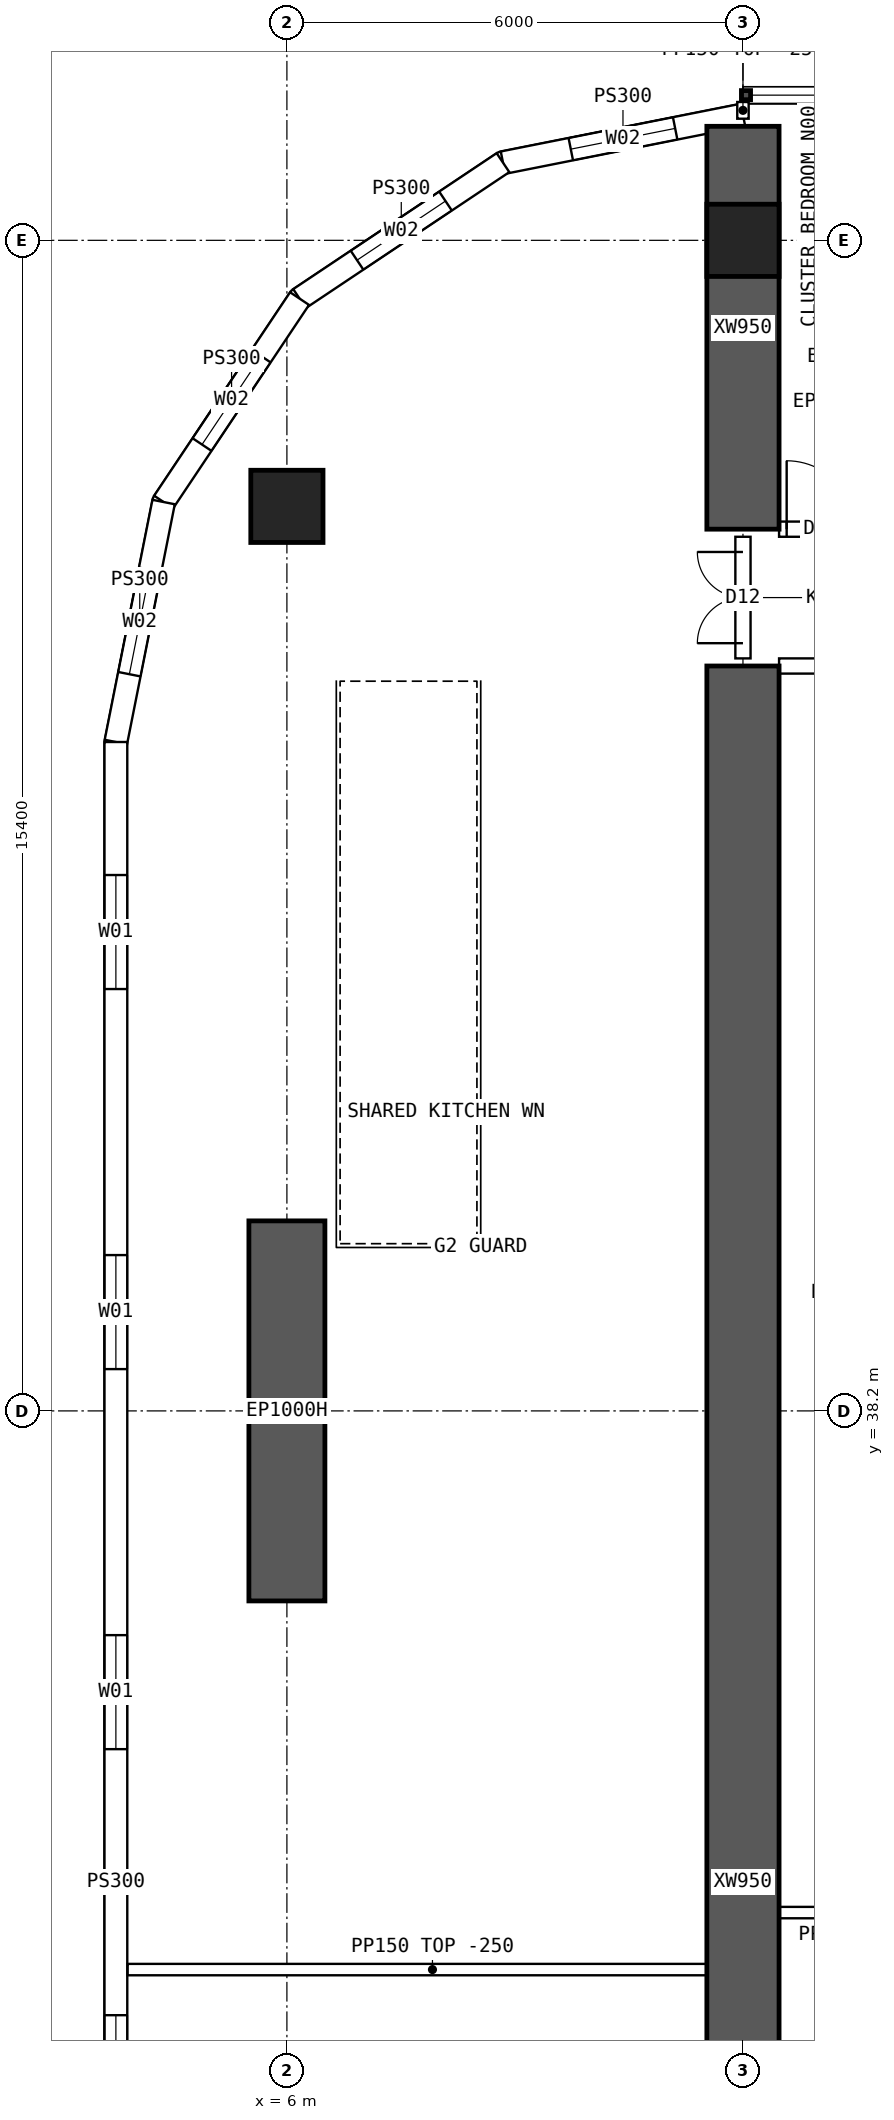
"""IFC4 building model, lengths in metres.
Left out: names, types, materials, properties, quantities, classifications, styles, units other than length and angle.
Written with IfcOpenShell. Run it as: python <this file> out.ifc"""

import sys

from ifc_helpers import new_model, si_unit, direction, frame, frame_2d, origin, origin_2d, place, context, subcontext, project, spatial, polyline, rectangle, hollow_rectangle, outline, extrude, element, fill, save


model = new_model("IFC4")
c1 = context("Model", 3, precision=1e-05, world=origin(), true_north=direction((0.0, 1.0)))
c2 = subcontext(c1, "Body", "Model", "MODEL_VIEW")
j1 = project(units=[si_unit("LENGTHUNIT", "METRE"), si_unit("PLANEANGLEUNIT", "RADIAN")], contexts=[c1])
p1 = place(None, origin())
s1 = spatial("IfcSite", under=j1, at=p1, CompositionType="ELEMENT")
p2 = place(p1, origin())
s2 = spatial("IfcBuilding", under=s1, at=p2, CompositionType="ELEMENT")
p3 = place(p2, frame((0.0, 0.0, 118.15)))
s3 = spatial("IfcBuildingStorey", under=s2, at=p3, CompositionType="ELEMENT", Elevation=118.15)
for number, where, z_axis, x_axis in (
    (1, (12.0, 53.6, 0.0), (0.0, 0.0, 1.0), (1.0, 0.0, 0.0)),
    (2, (6.0, 50.1, 0.0), (0.0, 0.0, 1.0), (1.0, 0.0, 0.0)),
):
    element("IfcColumn", number, at=place(p3, frame(where, z_axis=z_axis, x_axis=x_axis)), inside=s3, PredefinedType="COLUMN", context=c2, shape_type="SweptSolid", body=[
        extrude(hollow_rectangle(XDim=0.95, YDim=0.95, WallThickness=0.095, at=origin_2d()), origin(), (0.0, 0.0, 1.0), 3.75),
    ])
p4 = place(p3, frame((6.0, 35.7, 0.0), z_axis=(0.0, 0.0, 1.0), x_axis=(0.0, 1.0, 0.0)))
e3 = element("IfcWall", 3, at=p4, inside=s3, PredefinedType="SHEAR", context=c2, shape_type="SweptSolid", body=[
    extrude(rectangle(XDim=5.0, YDim=1.0, at=frame_2d((2.5, 0.0))), origin(), (0.0, 0.0, 1.0), 3.75),
])
p5 = place(p3, frame((12.0, 49.8, 0.0), z_axis=(0.0, 0.0, 1.0), x_axis=(0.0, 1.0, 0.0)))
e4 = element("IfcWall", 4, at=p5, inside=s3, PredefinedType="SHEAR", context=c2, shape_type="SweptSolid", body=[
    extrude(rectangle(XDim=5.3, YDim=0.95, at=frame_2d((2.65, 0.0))), origin(), (0.0, 0.0, 1.0), 3.75),
])
p6 = place(p3, frame((12.0, 16.0, 0.0), z_axis=(0.0, 0.0, 1.0), x_axis=(0.0, 1.0, 0.0)))
e5 = element("IfcWall", 5, at=p6, inside=s3, PredefinedType="SHEAR", context=c2, shape_type="SweptSolid", body=[
    extrude(rectangle(XDim=32.0, YDim=0.95, at=frame_2d((16.0, 0.0))), origin(), (0.0, 0.0, 1.0), 3.75),
])
p7 = place(p3, frame((3.75, 47.0, 0.0), z_axis=(0.0, 0.0, 1.0), x_axis=(0.0, -1.0, 0.0)))
e6 = element("IfcWall", 6, at=p7, inside=s3, PredefinedType="SOLIDWALL", context=c2, shape_type="SweptSolid", body=[
    extrude(outline(polyline([(-0.015, -0.15), (30.015, -0.15), (29.985, 0.15), (0.015, 0.15), (-0.015, -0.15)])), origin(), (0.0, 0.0, 1.0), 3.5),
])
p8 = place(p7, frame((1.75, 0.0, 0.9)))
e7 = element("IfcOpeningElement", 7, at=p8, cuts=e6, PredefinedType="OPENING", context=c2, shape_type="SweptSolid", body=[
    extrude(rectangle(XDim=1.5, YDim=2.0, at=frame_2d((0.75, 1.0))), frame((0.0, 0.16, 0.0), z_axis=(0.0, -1.0, 0.0), x_axis=(1.0, 0.0, 0.0)), (0.0, 0.0, 1.0), 0.32),
])
p9 = place(p7, frame((6.75, 0.0, 0.9)))
e8 = element("IfcOpeningElement", 8, at=p9, cuts=e6, PredefinedType="OPENING", context=c2, shape_type="SweptSolid", body=[
    extrude(rectangle(XDim=1.5, YDim=2.0, at=frame_2d((0.75, 1.0))), frame((0.0, 0.16, 0.0), z_axis=(0.0, -1.0, 0.0), x_axis=(1.0, 0.0, 0.0)), (0.0, 0.0, 1.0), 0.32),
])
p10 = place(p7, frame((11.75, 0.0, 0.9)))
e9 = element("IfcOpeningElement", 9, at=p10, cuts=e6, PredefinedType="OPENING", context=c2, shape_type="SweptSolid", body=[
    extrude(rectangle(XDim=1.5, YDim=2.0, at=frame_2d((0.75, 1.0))), frame((0.0, 0.16, 0.0), z_axis=(0.0, -1.0, 0.0), x_axis=(1.0, 0.0, 0.0)), (0.0, 0.0, 1.0), 0.32),
])
p11 = place(p7, frame((16.75, 0.0, 0.9)))
e10 = element("IfcOpeningElement", 10, at=p11, cuts=e6, PredefinedType="OPENING", context=c2, shape_type="SweptSolid", body=[
    extrude(rectangle(XDim=1.5, YDim=2.0, at=frame_2d((0.75, 1.0))), frame((0.0, 0.16, 0.0), z_axis=(0.0, -1.0, 0.0), x_axis=(1.0, 0.0, 0.0)), (0.0, 0.0, 1.0), 0.32),
])
p12 = place(p7, frame((21.75, 0.0, 0.9)))
e11 = element("IfcOpeningElement", 11, at=p12, cuts=e6, PredefinedType="OPENING", context=c2, shape_type="SweptSolid", body=[
    extrude(rectangle(XDim=1.5, YDim=2.0, at=frame_2d((0.75, 1.0))), frame((0.0, 0.16, 0.0), z_axis=(0.0, -1.0, 0.0), x_axis=(1.0, 0.0, 0.0)), (0.0, 0.0, 1.0), 0.32),
])
p13 = place(p7, frame((26.75, 0.0, 0.9)))
e12 = element("IfcOpeningElement", 12, at=p13, cuts=e6, PredefinedType="OPENING", context=c2, shape_type="SweptSolid", body=[
    extrude(rectangle(XDim=1.5, YDim=2.0, at=frame_2d((0.75, 1.0))), frame((0.0, 0.16, 0.0), z_axis=(0.0, -1.0, 0.0), x_axis=(1.0, 0.0, 0.0)), (0.0, 0.0, 1.0), 0.32),
])
p14 = place(p3, frame((12.0, 55.25, 0.0), z_axis=(0.0, 0.0, 1.0), x_axis=(-0.980787251524, -0.195080412259, 0.0)))
e13 = element("IfcWall", 13, at=p14, inside=s3, PredefinedType="SOLIDWALL", context=c2, shape_type="SweptSolid", body=[
    extrude(outline(polyline([(-0.03, -0.15), (3.249, -0.15), (3.189, 0.15), (0.03, 0.15), (-0.03, -0.15)])), origin(), (0.0, 0.0, 1.0), 3.5),
])
p15 = place(p14, frame((0.909, 0.0, 0.9)))
e14 = element("IfcOpeningElement", 14, at=p15, cuts=e13, PredefinedType="OPENING", context=c2, shape_type="SweptSolid", body=[
    extrude(rectangle(XDim=1.4, YDim=1.8, at=frame_2d((0.7, 0.9))), frame((0.0, 0.16, 0.0), z_axis=(0.0, -1.0, 0.0), x_axis=(1.0, 0.0, 0.0)), (0.0, 0.0, 1.0), 0.32),
])
p16 = place(p3, frame((8.843, 54.622, 0.0), z_axis=(0.0, 0.0, 1.0), x_axis=(-0.831443069936, -0.555609954424, 0.0)))
e15 = element("IfcWall", 15, at=p16, inside=s3, PredefinedType="SOLIDWALL", context=c2, shape_type="SweptSolid", body=[
    extrude(outline(polyline([(-0.03, -0.15), (3.249, -0.15), (3.189, 0.15), (0.03, 0.15), (-0.03, -0.15)])), origin(), (0.0, 0.0, 1.0), 3.5),
])
p17 = place(p16, frame((0.909, 0.0, 0.9)))
e16 = element("IfcOpeningElement", 16, at=p17, cuts=e15, PredefinedType="OPENING", context=c2, shape_type="SweptSolid", body=[
    extrude(rectangle(XDim=1.4, YDim=1.8, at=frame_2d((0.7, 0.9))), frame((0.0, 0.16, 0.0), z_axis=(0.0, -1.0, 0.0), x_axis=(1.0, 0.0, 0.0)), (0.0, 0.0, 1.0), 0.32),
])
p18 = place(p3, frame((6.167, 52.833, 0.0), z_axis=(0.0, 0.0, 1.0), x_axis=(-0.555609954424, -0.831443069936, 0.0)))
e17 = element("IfcWall", 17, at=p18, inside=s3, PredefinedType="SOLIDWALL", context=c2, shape_type="SweptSolid", body=[
    extrude(outline(polyline([(-0.03, -0.15), (3.249, -0.15), (3.189, 0.15), (0.03, 0.15), (-0.03, -0.15)])), origin(), (0.0, 0.0, 1.0), 3.5),
])
p19 = place(p18, frame((0.909, 0.0, 0.9)))
e18 = element("IfcOpeningElement", 18, at=p19, cuts=e17, PredefinedType="OPENING", context=c2, shape_type="SweptSolid", body=[
    extrude(rectangle(XDim=1.4, YDim=1.8, at=frame_2d((0.7, 0.9))), frame((0.0, 0.16, 0.0), z_axis=(0.0, -1.0, 0.0), x_axis=(1.0, 0.0, 0.0)), (0.0, 0.0, 1.0), 0.32),
])
p20 = place(p3, frame((4.378, 50.157, 0.0), z_axis=(0.0, 0.0, 1.0), x_axis=(-0.195080412259, -0.980787251524, 0.0)))
e19 = element("IfcWall", 19, at=p20, inside=s3, PredefinedType="SOLIDWALL", context=c2, shape_type="SweptSolid", body=[
    extrude(outline(polyline([(-0.03, -0.15), (3.234, -0.15), (3.204, 0.15), (0.03, 0.15), (-0.03, -0.15)])), origin(), (0.0, 0.0, 1.0), 3.5),
])
p21 = place(p20, frame((0.909, 0.0, 0.9)))
e20 = element("IfcOpeningElement", 20, at=p21, cuts=e19, PredefinedType="OPENING", context=c2, shape_type="SweptSolid", body=[
    extrude(rectangle(XDim=1.4, YDim=1.8, at=frame_2d((0.7, 0.9))), frame((0.0, 0.16, 0.0), z_axis=(0.0, -1.0, 0.0), x_axis=(1.0, 0.0, 0.0)), (0.0, 0.0, 1.0), 0.32),
])
p22 = place(p3, frame((12.475, 49.8, 0.0), z_axis=(0.0, 0.0, 1.0), x_axis=(1.0, 0.0, 0.0)))
e21 = element("IfcWall", 21, at=p22, inside=s3, PredefinedType="SOLIDWALL", context=c2, shape_type="SweptSolid", body=[
    extrude(outline(polyline([(0.0, 0.0), (5.05, 0.0), (5.05, 3.1), (0.0, 3.1), (0.0, 0.0)])), frame((0.0, 0.1, 0.0), z_axis=(0.0, -1.0, 0.0), x_axis=(1.0, 0.0, 0.0)), (0.0, 0.0, 1.0), 0.2),
])
p23 = place(p22, frame((0.1, 0.0, 0.0)))
e22 = element("IfcOpeningElement", 22, at=p23, cuts=e21, PredefinedType="OPENING", context=c2, shape_type="SweptSolid", body=[
    extrude(rectangle(XDim=0.9, YDim=2.1, at=frame_2d((0.45, 1.05))), frame((0.0, 0.11, 0.0), z_axis=(0.0, -1.0, 0.0), x_axis=(1.0, 0.0, 0.0)), (0.0, 0.0, 1.0), 0.22),
])
p24 = place(p22, frame((3.9, 0.0, 0.0)))
e23 = element("IfcOpeningElement", 23, at=p24, cuts=e21, PredefinedType="OPENING", context=c2, shape_type="SweptSolid", body=[
    extrude(rectangle(XDim=0.9, YDim=2.1, at=frame_2d((0.45, 1.05))), frame((0.0, 0.11, 0.0), z_axis=(0.0, -1.0, 0.0), x_axis=(1.0, 0.0, 0.0)), (0.0, 0.0, 1.0), 0.22),
])
p25 = place(p3, frame((12.475, 48.0, 0.0), z_axis=(0.0, 0.0, 1.0), x_axis=(1.0, 0.0, 0.0)))
e24 = element("IfcWall", 24, at=p25, inside=s3, PredefinedType="SOLIDWALL", context=c2, shape_type="SweptSolid", body=[
    extrude(rectangle(XDim=5.05, YDim=0.2, at=frame_2d((2.525, 0.0))), origin(), (0.0, 0.0, 1.0), 3.5),
])
p26 = place(p25, frame((3.325, 0.0, 0.0)))
e25 = element("IfcOpeningElement", 25, at=p26, cuts=e24, PredefinedType="OPENING", context=c2, shape_type="SweptSolid", body=[
    extrude(rectangle(XDim=1.6, YDim=2.1, at=frame_2d((0.8, 1.05))), frame((0.0, 0.11, 0.0), z_axis=(0.0, -1.0, 0.0), x_axis=(1.0, 0.0, 0.0)), (0.0, 0.0, 1.0), 0.22),
])
p27 = place(p3, frame((12.0, 31.6, 0.0), z_axis=(0.0, 0.0, 1.0), x_axis=(1.0, 0.0, 0.0)))
e26 = element("IfcWall", 26, at=p27, inside=s3, PredefinedType="PARTITIONING", context=c2, shape_type="SweptSolid", body=[
    extrude(rectangle(XDim=3.6, YDim=0.15, at=frame_2d((1.8, 0.0))), origin(), (0.0, 0.0, 1.0), 3.5),
])
p28 = place(p3, frame((3.905, 30.85, 0.0), z_axis=(0.0, 0.0, 1.0), x_axis=(1.0, 0.0, 0.0)))
e27 = element("IfcWall", 27, at=p28, inside=s3, PredefinedType="PARTITIONING", context=c2, shape_type="SweptSolid", body=[
    extrude(outline(polyline([(0.0, 0.0), (8.02, 0.0), (8.02, 3.5), (2.397, 3.5), (2.395, 3.05), (1.797, 3.05), (1.795, 3.5), (0.0, 3.5), (0.0, 0.0)])), frame((0.0, 0.075, 0.0), z_axis=(0.0, -1.0, 0.0), x_axis=(1.0, 0.0, 0.0)), (0.0, 0.0, 1.0), 0.15),
])
p29 = place(p3, frame((12.0, 48.1, 0.0), z_axis=(0.0, 0.0, 1.0), x_axis=(0.0, 1.0, 0.0)))
e28 = element("IfcWall", 28, at=p29, inside=s3, PredefinedType="SOLIDWALL", context=c2, shape_type="SweptSolid", body=[
    extrude(outline(polyline([(0.0, 0.0), (1.6, 0.0), (1.6, 3.1), (0.0, 3.1), (0.0, 0.0)])), frame((0.0, 0.1, 0.0), z_axis=(0.0, -1.0, 0.0), x_axis=(1.0, 0.0, 0.0)), (0.0, 0.0, 1.0), 0.2),
])
p30 = place(p29, frame((0.2, 0.0, 0.0)))
e29 = element("IfcOpeningElement", 29, at=p30, cuts=e28, PredefinedType="OPENING", context=c2, shape_type="SweptSolid", body=[
    extrude(rectangle(XDim=1.2, YDim=2.1, at=frame_2d((0.6, 1.05))), frame((0.0, 0.11, 0.0), z_axis=(0.0, -1.0, 0.0), x_axis=(1.0, 0.0, 0.0)), (0.0, 0.0, 1.0), 0.22),
])
p31 = place(p3, frame((12.0, 55.2, 0.0), z_axis=(0.0, 0.0, 1.0), x_axis=(0.0, 1.0, 0.0)))
e30 = element("IfcWall", 30, at=p31, inside=s3, PredefinedType="PARTITIONING", context=c2, shape_type="SweptSolid", body=[
    extrude(rectangle(XDim=0.22, YDim=0.15, at=frame_2d((0.11, 0.0))), origin(), (0.0, 0.0, 1.0), 3.5),
])
p32 = place(p8, origin())
e31 = element("IfcWindow", 31, at=p32, inside=s3, PartitioningType="SINGLE_PANEL", PredefinedType="WINDOW", context=c2, shape_type="SweptSolid", body=[
    extrude(rectangle(XDim=1.5, YDim=2.0, at=frame_2d((0.75, 1.0))), frame((0.0, 0.03, 0.0), z_axis=(0.0, -1.0, 0.0), x_axis=(1.0, 0.0, 0.0)), (0.0, 0.0, 1.0), 0.06),
])
fill(e7, e31)
p33 = place(p9, origin())
e32 = element("IfcWindow", 32, at=p33, inside=s3, PartitioningType="SINGLE_PANEL", PredefinedType="WINDOW", context=c2, shape_type="SweptSolid", body=[
    extrude(rectangle(XDim=1.5, YDim=2.0, at=frame_2d((0.75, 1.0))), frame((0.0, 0.03, 0.0), z_axis=(0.0, -1.0, 0.0), x_axis=(1.0, 0.0, 0.0)), (0.0, 0.0, 1.0), 0.06),
])
fill(e8, e32)
p34 = place(p10, origin())
e33 = element("IfcWindow", 33, at=p34, inside=s3, PartitioningType="SINGLE_PANEL", PredefinedType="WINDOW", context=c2, shape_type="SweptSolid", body=[
    extrude(rectangle(XDim=1.5, YDim=2.0, at=frame_2d((0.75, 1.0))), frame((0.0, 0.03, 0.0), z_axis=(0.0, -1.0, 0.0), x_axis=(1.0, 0.0, 0.0)), (0.0, 0.0, 1.0), 0.06),
])
fill(e9, e33)
p35 = place(p11, origin())
e34 = element("IfcWindow", 34, at=p35, inside=s3, PartitioningType="SINGLE_PANEL", PredefinedType="WINDOW", context=c2, shape_type="SweptSolid", body=[
    extrude(rectangle(XDim=1.5, YDim=2.0, at=frame_2d((0.75, 1.0))), frame((0.0, 0.03, 0.0), z_axis=(0.0, -1.0, 0.0), x_axis=(1.0, 0.0, 0.0)), (0.0, 0.0, 1.0), 0.06),
])
fill(e10, e34)
p36 = place(p15, origin())
e35 = element("IfcWindow", 35, at=p36, inside=s3, PartitioningType="SINGLE_PANEL", PredefinedType="WINDOW", context=c2, shape_type="SweptSolid", body=[
    extrude(rectangle(XDim=1.4, YDim=1.8, at=frame_2d((0.7, 0.9))), frame((0.0, 0.03, 0.0), z_axis=(0.0, -1.0, 0.0), x_axis=(1.0, 0.0, 0.0)), (0.0, 0.0, 1.0), 0.06),
])
fill(e14, e35)
p37 = place(p17, origin())
e36 = element("IfcWindow", 36, at=p37, inside=s3, PartitioningType="SINGLE_PANEL", PredefinedType="WINDOW", context=c2, shape_type="SweptSolid", body=[
    extrude(rectangle(XDim=1.4, YDim=1.8, at=frame_2d((0.7, 0.9))), frame((0.0, 0.03, 0.0), z_axis=(0.0, -1.0, 0.0), x_axis=(1.0, 0.0, 0.0)), (0.0, 0.0, 1.0), 0.06),
])
fill(e16, e36)
p38 = place(p19, origin())
e37 = element("IfcWindow", 37, at=p38, inside=s3, PartitioningType="SINGLE_PANEL", PredefinedType="WINDOW", context=c2, shape_type="SweptSolid", body=[
    extrude(rectangle(XDim=1.4, YDim=1.8, at=frame_2d((0.7, 0.9))), frame((0.0, 0.03, 0.0), z_axis=(0.0, -1.0, 0.0), x_axis=(1.0, 0.0, 0.0)), (0.0, 0.0, 1.0), 0.06),
])
fill(e18, e37)
p39 = place(p21, origin())
e38 = element("IfcWindow", 38, at=p39, inside=s3, PartitioningType="SINGLE_PANEL", PredefinedType="WINDOW", context=c2, shape_type="SweptSolid", body=[
    extrude(rectangle(XDim=1.4, YDim=1.8, at=frame_2d((0.7, 0.9))), frame((0.0, 0.03, 0.0), z_axis=(0.0, -1.0, 0.0), x_axis=(1.0, 0.0, 0.0)), (0.0, 0.0, 1.0), 0.06),
])
fill(e20, e38)
p40 = place(p23, origin())
e39 = element("IfcDoor", 39, at=p40, inside=s3, OperationType="SINGLE_SWING_LEFT", PredefinedType="DOOR", context=c2, shape_type="SweptSolid", body=[
    extrude(rectangle(XDim=0.9, YDim=2.1, at=frame_2d((0.45, 1.05))), frame((0.0, 0.025, 0.0), z_axis=(0.0, -1.0, 0.0), x_axis=(1.0, 0.0, 0.0)), (0.0, 0.0, 1.0), 0.05),
])
fill(e22, e39)
p41 = place(p30, origin())
e40 = element("IfcDoor", 40, at=p41, inside=s3, OperationType="DOUBLE_DOOR_SINGLE_SWING", PredefinedType="DOOR", context=c2, shape_type="SweptSolid", body=[
    extrude(rectangle(XDim=1.2, YDim=2.1, at=frame_2d((0.6, 1.05))), frame((0.0, 0.025, 0.0), z_axis=(0.0, -1.0, 0.0), x_axis=(1.0, 0.0, 0.0)), (0.0, 0.0, 1.0), 0.05),
])
fill(e29, e40)
save(model, sys.argv[1])
